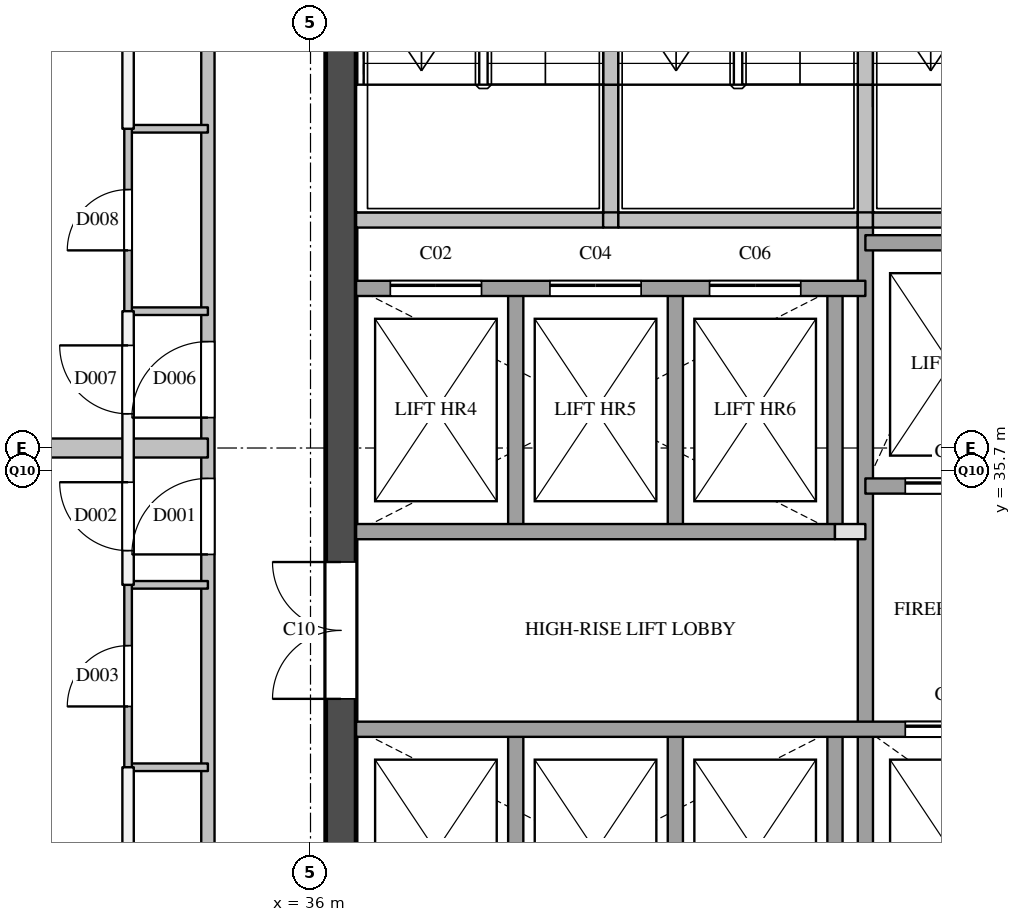
"""IFC4 building model, lengths in metres.
Left out: names, types, materials, properties, quantities, classifications, styles, units other than length and angle.
Written with IfcOpenShell. Run it as: python <this file> out.ifc"""

import sys

from ifc_helpers import new_model, si_unit, direction, frame, frame_2d, origin, place, context, subcontext, project, spatial, rectangle, extrude, element, fill, save


model = new_model("IFC4")
c1 = context("Model", 3, precision=1e-05, world=origin(), true_north=direction((0.0, 1.0)))
c2 = subcontext(c1, "Body", "Model", "MODEL_VIEW")
j1 = project(units=[si_unit("LENGTHUNIT", "METRE"), si_unit("PLANEANGLEUNIT", "RADIAN")], contexts=[c1])
p1 = place(None, origin())
s1 = spatial("IfcSite", under=j1, at=p1, CompositionType="ELEMENT")
p2 = place(p1, origin())
s2 = spatial("IfcBuilding", under=s1, at=p2, CompositionType="ELEMENT")
p3 = place(p2, frame((0.0, 0.0, 273.5)))
s3 = spatial("IfcBuildingStorey", under=s2, at=p3, CompositionType="ELEMENT", Elevation=273.5)
p4 = place(p3, frame((36.4, 29.1, 0.0), z_axis=(0.0, 0.0, 1.0), x_axis=(0.0, 1.0, 0.0)))
e1 = element("IfcWall", 1, at=p4, inside=s3, PredefinedType="SHEAR", context=c2, shape_type="SweptSolid", body=[
    extrude(rectangle(XDim=20.3, YDim=0.4, at=frame_2d((10.15, 0.0))), origin(), (0.0, 0.0, 1.0), 3.6),
])
p5 = place(p4, frame((3.6, 0.0, 0.0)))
e2 = element("IfcOpeningElement", 2, at=p5, cuts=e1, PredefinedType="OPENING", context=c2, shape_type="SweptSolid", body=[
    extrude(rectangle(XDim=1.8, YDim=2.1, at=frame_2d((0.9, 1.05))), frame((0.0, 0.21, 0.0), z_axis=(0.0, -1.0, 0.0), x_axis=(1.0, 0.0, 0.0)), (0.0, 0.0, 1.0), 0.42),
])
p6 = place(p4, frame((16.4, 0.0, 0.0)))
e3 = element("IfcOpeningElement", 3, at=p6, cuts=e1, PredefinedType="OPENING", context=c2, shape_type="SweptSolid", body=[
    extrude(rectangle(XDim=1.0, YDim=2.1, at=frame_2d((0.5, 1.05))), frame((0.0, 0.21, 0.0), z_axis=(0.0, -1.0, 0.0), x_axis=(1.0, 0.0, 0.0)), (0.0, 0.0, 1.0), 0.42),
])
p7 = place(p3, frame((38.7, 29.1, 0.0), z_axis=(0.0, 0.0, 1.0), x_axis=(0.0, 1.0, 0.0)))
e4 = element("IfcWall", 4, at=p7, inside=s3, PredefinedType="SOLIDWALL", context=c2, shape_type="SweptSolid", body=[
    extrude(rectangle(XDim=3.2, YDim=0.2, at=frame_2d((1.6, 0.0))), origin(), (0.0, 0.0, 1.0), 3.6),
])
p8 = place(p3, frame((38.7, 34.9, 0.0), z_axis=(0.0, 0.0, 1.0), x_axis=(0.0, 1.0, 0.0)))
e5 = element("IfcWall", 5, at=p8, inside=s3, PredefinedType="SOLIDWALL", context=c2, shape_type="SweptSolid", body=[
    extrude(rectangle(XDim=3.2, YDim=0.2, at=frame_2d((1.6, 0.0))), origin(), (0.0, 0.0, 1.0), 3.6),
])
p9 = place(p3, frame((39.95, 39.0, 0.0), z_axis=(0.0, 0.0, 1.0), x_axis=(0.0, 1.0, 0.0)))
e6 = element("IfcWall", 6, at=p9, inside=s3, PredefinedType="SOLIDWALL", context=c2, shape_type="SweptSolid", body=[
    extrude(rectangle(XDim=1.78, YDim=0.2, at=frame_2d((0.89, 0.0))), origin(), (0.0, 0.0, 1.0), 3.6),
])
p10 = place(p3, frame((39.95, 40.78, 0.0), z_axis=(0.0, 0.0, 1.0), x_axis=(0.0, 1.0, 0.0)))
e7 = element("IfcWall", 7, at=p10, inside=s3, PredefinedType="SOLIDWALL", context=c2, shape_type="SweptSolid", body=[
    extrude(rectangle(XDim=4.42, YDim=0.2, at=frame_2d((2.21, 0.0))), origin(), (0.0, 0.0, 1.0), 3.6),
])
p11 = place(p3, frame((40.8, 29.1, 0.0), z_axis=(0.0, 0.0, 1.0), x_axis=(0.0, 1.0, 0.0)))
e8 = element("IfcWall", 8, at=p11, inside=s3, PredefinedType="SOLIDWALL", context=c2, shape_type="SweptSolid", body=[
    extrude(rectangle(XDim=3.2, YDim=0.2, at=frame_2d((1.6, 0.0))), origin(), (0.0, 0.0, 1.0), 3.6),
])
p12 = place(p3, frame((40.8, 34.9, 0.0), z_axis=(0.0, 0.0, 1.0), x_axis=(0.0, 1.0, 0.0)))
e9 = element("IfcWall", 9, at=p12, inside=s3, PredefinedType="SOLIDWALL", context=c2, shape_type="SweptSolid", body=[
    extrude(rectangle(XDim=3.2, YDim=0.2, at=frame_2d((1.6, 0.0))), origin(), (0.0, 0.0, 1.0), 3.6),
])
p13 = place(p3, frame((42.9, 29.1, 0.0), z_axis=(0.0, 0.0, 1.0), x_axis=(0.0, 1.0, 0.0)))
e10 = element("IfcWall", 10, at=p13, inside=s3, PredefinedType="SOLIDWALL", context=c2, shape_type="SweptSolid", body=[
    extrude(rectangle(XDim=3.2, YDim=0.2, at=frame_2d((1.6, 0.0))), origin(), (0.0, 0.0, 1.0), 3.6),
])
p14 = place(p3, frame((42.9, 34.9, 0.0), z_axis=(0.0, 0.0, 1.0), x_axis=(0.0, 1.0, 0.0)))
e11 = element("IfcWall", 11, at=p14, inside=s3, PredefinedType="SOLIDWALL", context=c2, shape_type="SweptSolid", body=[
    extrude(rectangle(XDim=3.2, YDim=0.2, at=frame_2d((1.6, 0.0))), origin(), (0.0, 0.0, 1.0), 3.6),
])
p15 = place(p3, frame((43.3, 29.1, 0.0), z_axis=(0.0, 0.0, 1.0), x_axis=(0.0, 1.0, 0.0)))
e12 = element("IfcWall", 12, at=p15, inside=s3, PredefinedType="SOLIDWALL", context=c2, shape_type="SweptSolid", body=[
    extrude(rectangle(XDim=9.9, YDim=0.2, at=frame_2d((4.95, 0.0))), origin(), (0.0, 0.0, 1.0), 3.6),
])
p16 = place(p3, frame((43.3, 39.0, 0.0), z_axis=(0.0, 0.0, 1.0), x_axis=(0.0, 1.0, 0.0)))
e13 = element("IfcWall", 13, at=p16, inside=s3, PredefinedType="SOLIDWALL", context=c2, shape_type="SweptSolid", body=[
    extrude(rectangle(XDim=1.78, YDim=0.2, at=frame_2d((0.89, 0.0))), origin(), (0.0, 0.0, 1.0), 3.6),
])
p17 = place(p3, frame((43.3, 40.78, 0.0), z_axis=(0.0, 0.0, 1.0), x_axis=(0.0, 1.0, 0.0)))
e14 = element("IfcWall", 14, at=p17, inside=s3, PredefinedType="SOLIDWALL", context=c2, shape_type="SweptSolid", body=[
    extrude(rectangle(XDim=4.42, YDim=0.2, at=frame_2d((2.21, 0.0))), origin(), (0.0, 0.0, 1.0), 3.6),
])
p18 = place(p3, frame((36.6, 32.3, 0.0), z_axis=(0.0, 0.0, 1.0), x_axis=(1.0, 0.0, 0.0)))
e15 = element("IfcWall", 15, at=p18, inside=s3, PredefinedType="SOLIDWALL", context=c2, shape_type="SweptSolid", body=[
    extrude(rectangle(XDim=11.2, YDim=0.2, at=frame_2d((5.6, 0.0))), origin(), (0.0, 0.0, 1.0), 3.6),
])
p19 = place(p18, frame((7.225, 0.0, 0.0)))
e16 = element("IfcOpeningElement", 16, at=p19, cuts=e15, PredefinedType="OPENING", context=c2, shape_type="SweptSolid", body=[
    extrude(rectangle(XDim=1.2, YDim=2.1, at=frame_2d((0.6, 1.05))), frame((0.0, 0.11, 0.0), z_axis=(0.0, -1.0, 0.0), x_axis=(1.0, 0.0, 0.0)), (0.0, 0.0, 1.0), 0.22),
])
p20 = place(p18, frame((9.475, 0.0, 0.0)))
e17 = element("IfcOpeningElement", 17, at=p20, cuts=e15, PredefinedType="OPENING", context=c2, shape_type="SweptSolid", body=[
    extrude(rectangle(XDim=1.2, YDim=2.1, at=frame_2d((0.6, 1.05))), frame((0.0, 0.11, 0.0), z_axis=(0.0, -1.0, 0.0), x_axis=(1.0, 0.0, 0.0)), (0.0, 0.0, 1.0), 0.22),
])
p21 = place(p3, frame((42.9, 34.9, 0.0), z_axis=(0.0, 0.0, 1.0), x_axis=(1.0, 0.0, 0.0)))
e18 = element("IfcWall", 18, at=p21, inside=s3, PredefinedType="PARTITIONING", context=c2, shape_type="SweptSolid", body=[
    extrude(rectangle(XDim=0.4, YDim=0.2, at=frame_2d((0.2, 0.0))), origin(), (0.0, 0.0, 1.0), 3.6),
])
p22 = place(p3, frame((36.6, 34.9, 0.0), z_axis=(0.0, 0.0, 1.0), x_axis=(1.0, 0.0, 0.0)))
e19 = element("IfcWall", 19, at=p22, inside=s3, PredefinedType="SOLIDWALL", context=c2, shape_type="SweptSolid", body=[
    extrude(rectangle(XDim=6.3, YDim=0.2, at=frame_2d((3.15, 0.0))), origin(), (0.0, 0.0, 1.0), 3.6),
])
p23 = place(p3, frame((43.3, 35.5, 0.0), z_axis=(0.0, 0.0, 1.0), x_axis=(1.0, 0.0, 0.0)))
e20 = element("IfcWall", 20, at=p23, inside=s3, PredefinedType="SOLIDWALL", context=c2, shape_type="SweptSolid", body=[
    extrude(rectangle(XDim=4.5, YDim=0.2, at=frame_2d((2.25, 0.0))), origin(), (0.0, 0.0, 1.0), 3.6),
])
p24 = place(p23, frame((0.525, 0.0, 0.0)))
e21 = element("IfcOpeningElement", 21, at=p24, cuts=e20, PredefinedType="OPENING", context=c2, shape_type="SweptSolid", body=[
    extrude(rectangle(XDim=1.2, YDim=2.1, at=frame_2d((0.6, 1.05))), frame((0.0, 0.11, 0.0), z_axis=(0.0, -1.0, 0.0), x_axis=(1.0, 0.0, 0.0)), (0.0, 0.0, 1.0), 0.22),
])
p25 = place(p23, frame((3.025, 0.0, 0.0)))
e22 = element("IfcOpeningElement", 22, at=p25, cuts=e20, PredefinedType="OPENING", context=c2, shape_type="SweptSolid", body=[
    extrude(rectangle(XDim=0.7, YDim=2.1, at=frame_2d((0.35, 1.05))), frame((0.0, 0.11, 0.0), z_axis=(0.0, -1.0, 0.0), x_axis=(1.0, 0.0, 0.0)), (0.0, 0.0, 1.0), 0.22),
])
p26 = place(p3, frame((36.6, 38.1, 0.0), z_axis=(0.0, 0.0, 1.0), x_axis=(1.0, 0.0, 0.0)))
e23 = element("IfcWall", 23, at=p26, inside=s3, PredefinedType="SOLIDWALL", context=c2, shape_type="SweptSolid", body=[
    extrude(rectangle(XDim=6.7, YDim=0.2, at=frame_2d((3.35, 0.0))), origin(), (0.0, 0.0, 1.0), 3.6),
])
p27 = place(p26, frame((0.45, 0.0, 0.0)))
e24 = element("IfcOpeningElement", 24, at=p27, cuts=e23, PredefinedType="OPENING", context=c2, shape_type="SweptSolid", body=[
    extrude(rectangle(XDim=1.2, YDim=2.1, at=frame_2d((0.6, 1.05))), frame((0.0, 0.11, 0.0), z_axis=(0.0, -1.0, 0.0), x_axis=(1.0, 0.0, 0.0)), (0.0, 0.0, 1.0), 0.22),
])
p28 = place(p26, frame((2.55, 0.0, 0.0)))
e25 = element("IfcOpeningElement", 25, at=p28, cuts=e23, PredefinedType="OPENING", context=c2, shape_type="SweptSolid", body=[
    extrude(rectangle(XDim=1.2, YDim=2.1, at=frame_2d((0.6, 1.05))), frame((0.0, 0.11, 0.0), z_axis=(0.0, -1.0, 0.0), x_axis=(1.0, 0.0, 0.0)), (0.0, 0.0, 1.0), 0.22),
])
p29 = place(p26, frame((4.65, 0.0, 0.0)))
e26 = element("IfcOpeningElement", 26, at=p29, cuts=e23, PredefinedType="OPENING", context=c2, shape_type="SweptSolid", body=[
    extrude(rectangle(XDim=1.2, YDim=2.1, at=frame_2d((0.6, 1.05))), frame((0.0, 0.11, 0.0), z_axis=(0.0, -1.0, 0.0), x_axis=(1.0, 0.0, 0.0)), (0.0, 0.0, 1.0), 0.22),
])
p30 = place(p3, frame((43.3, 38.7, 0.0), z_axis=(0.0, 0.0, 1.0), x_axis=(1.0, 0.0, 0.0)))
e27 = element("IfcWall", 27, at=p30, inside=s3, PredefinedType="SOLIDWALL", context=c2, shape_type="SweptSolid", body=[
    extrude(rectangle(XDim=4.5, YDim=0.2, at=frame_2d((2.25, 0.0))), origin(), (0.0, 0.0, 1.0), 3.6),
])
p31 = place(p3, frame((36.6, 39.0, 0.0), z_axis=(0.0, 0.0, 1.0), x_axis=(1.0, 0.0, 0.0)))
e28 = element("IfcWall", 28, at=p31, inside=s3, PredefinedType="SOLIDWALL", context=c2, shape_type="SweptSolid", body=[
    extrude(rectangle(XDim=3.25, YDim=0.2, at=frame_2d((1.625, 0.0))), origin(), (0.0, 0.0, 1.0), 3.6),
])
p32 = place(p3, frame((39.85, 39.0, 0.0), z_axis=(0.0, 0.0, 1.0), x_axis=(1.0, 0.0, 0.0)))
e29 = element("IfcWall", 29, at=p32, inside=s3, PredefinedType="SOLIDWALL", context=c2, shape_type="SweptSolid", body=[
    extrude(rectangle(XDim=0.2, YDim=0.2, at=frame_2d((0.1, 0.0))), origin(), (0.0, 0.0, 1.0), 3.6),
])
p33 = place(p3, frame((40.05, 39.0, 0.0), z_axis=(0.0, 0.0, 1.0), x_axis=(1.0, 0.0, 0.0)))
e30 = element("IfcWall", 30, at=p33, inside=s3, PredefinedType="SOLIDWALL", context=c2, shape_type="SweptSolid", body=[
    extrude(rectangle(XDim=3.15, YDim=0.2, at=frame_2d((1.575, 0.0))), origin(), (0.0, 0.0, 1.0), 3.6),
])
p34 = place(p3, frame((43.2, 39.0, 0.0), z_axis=(0.0, 0.0, 1.0), x_axis=(1.0, 0.0, 0.0)))
e31 = element("IfcWall", 31, at=p34, inside=s3, PredefinedType="SOLIDWALL", context=c2, shape_type="SweptSolid", body=[
    extrude(rectangle(XDim=0.2, YDim=0.2, at=frame_2d((0.1, 0.0))), origin(), (0.0, 0.0, 1.0), 3.6),
])
p35 = place(p3, frame((43.4, 39.0, 0.0), z_axis=(0.0, 0.0, 1.0), x_axis=(1.0, 0.0, 0.0)))
e32 = element("IfcWall", 32, at=p35, inside=s3, PredefinedType="SOLIDWALL", context=c2, shape_type="SweptSolid", body=[
    extrude(rectangle(XDim=3.25, YDim=0.2, at=frame_2d((1.625, 0.0))), origin(), (0.0, 0.0, 1.0), 3.6),
])
p36 = place(p3, frame((34.65, 28.5, 0.0), z_axis=(0.0, 0.0, 1.0), x_axis=(0.0, 1.0, 0.0)))
e33 = element("IfcWall", 33, at=p36, inside=s3, PredefinedType="PARTITIONING", context=c2, shape_type="SweptSolid", body=[
    extrude(rectangle(XDim=22.85, YDim=0.175, at=frame_2d((11.425, 0.0))), origin(), (0.0, 0.0, 1.0), 3.6),
])
p37 = place(p36, frame((6.1, 0.0, 0.0)))
e34 = element("IfcOpeningElement", 34, at=p37, cuts=e33, PredefinedType="OPENING", context=c2, shape_type="SweptSolid", body=[
    extrude(rectangle(XDim=1.0, YDim=2.1, at=frame_2d((0.5, 1.05))), frame((0.0, 0.097, 0.0), z_axis=(0.0, -1.0, 0.0), x_axis=(1.0, 0.0, 0.0)), (0.0, 0.0, 1.0), 0.195),
])
p38 = place(p36, frame((7.9, 0.0, 0.0)))
e35 = element("IfcOpeningElement", 35, at=p38, cuts=e33, PredefinedType="OPENING", context=c2, shape_type="SweptSolid", body=[
    extrude(rectangle(XDim=1.0, YDim=2.1, at=frame_2d((0.5, 1.05))), frame((0.0, 0.097, 0.0), z_axis=(0.0, -1.0, 0.0), x_axis=(1.0, 0.0, 0.0)), (0.0, 0.0, 1.0), 0.195),
])
p39 = place(p3, frame((33.6, 27.0, 0.0), z_axis=(0.0, 0.0, 1.0), x_axis=(0.0, 1.0, 0.0)))
e36 = element("IfcWall", 36, at=p39, inside=s3, PredefinedType="PARTITIONING", context=c2, shape_type="SweptSolid", body=[
    extrude(rectangle(XDim=4.8, YDim=0.15, at=frame_2d((2.4, 0.0))), origin(), (0.0, 0.0, 1.0), 2.6),
])
p40 = place(p39, frame((1.95, 0.0, 0.0)))
e37 = element("IfcOpeningElement", 37, at=p40, cuts=e36, PredefinedType="OPENING", context=c2, shape_type="SweptSolid", body=[
    extrude(rectangle(XDim=0.9, YDim=2.1, at=frame_2d((0.45, 1.05))), frame((0.0, 0.085, 0.0), z_axis=(0.0, -1.0, 0.0), x_axis=(1.0, 0.0, 0.0)), (0.0, 0.0, 1.0), 0.17),
])
p41 = place(p3, frame((33.6, 34.2, 0.0), z_axis=(0.0, 0.0, 1.0), x_axis=(0.0, 1.0, 0.0)))
e38 = element("IfcWall", 38, at=p41, inside=s3, PredefinedType="PARTITIONING", context=c2, shape_type="SweptSolid", body=[
    extrude(rectangle(XDim=3.6, YDim=0.15, at=frame_2d((1.8, 0.0))), origin(), (0.0, 0.0, 1.0), 3.6),
])
p42 = place(p41, frame((0.45, 0.0, 0.0)))
e39 = element("IfcOpeningElement", 39, at=p42, cuts=e38, PredefinedType="OPENING", context=c2, shape_type="SweptSolid", body=[
    extrude(rectangle(XDim=0.9, YDim=2.1, at=frame_2d((0.45, 1.05))), frame((0.0, 0.085, 0.0), z_axis=(0.0, -1.0, 0.0), x_axis=(1.0, 0.0, 0.0)), (0.0, 0.0, 1.0), 0.17),
])
p43 = place(p41, frame((2.25, 0.0, 0.0)))
e40 = element("IfcOpeningElement", 40, at=p43, cuts=e38, PredefinedType="OPENING", context=c2, shape_type="SweptSolid", body=[
    extrude(rectangle(XDim=0.9, YDim=2.1, at=frame_2d((0.45, 1.05))), frame((0.0, 0.085, 0.0), z_axis=(0.0, -1.0, 0.0), x_axis=(1.0, 0.0, 0.0)), (0.0, 0.0, 1.0), 0.17),
])
p44 = place(p3, frame((33.6, 40.2, 0.0), z_axis=(0.0, 0.0, 1.0), x_axis=(0.0, 1.0, 0.0)))
e41 = element("IfcWall", 41, at=p44, inside=s3, PredefinedType="PARTITIONING", context=c2, shape_type="SweptSolid", body=[
    extrude(rectangle(XDim=13.8, YDim=0.15, at=frame_2d((6.9, 0.0))), origin(), (0.0, 0.0, 1.0), 2.6),
])
p45 = place(p44, frame((6.45, 0.0, 0.0)))
e42 = element("IfcOpeningElement", 42, at=p45, cuts=e41, PredefinedType="OPENING", context=c2, shape_type="SweptSolid", body=[
    extrude(rectangle(XDim=0.9, YDim=2.1, at=frame_2d((0.45, 1.05))), frame((0.0, 0.085, 0.0), z_axis=(0.0, -1.0, 0.0), x_axis=(1.0, 0.0, 0.0)), (0.0, 0.0, 1.0), 0.17),
])
p46 = place(p3, frame((18.0, 36.0, 0.0), z_axis=(0.0, 0.0, 1.0), x_axis=(1.0, 0.0, 0.0)))
e43 = element("IfcWall", 43, at=p46, inside=s3, PredefinedType="PARTITIONING", context=c2, shape_type="SweptSolid", body=[
    extrude(rectangle(XDim=16.65, YDim=0.25, at=frame_2d((8.325, 0.0))), origin(), (0.0, 0.0, 1.0), 3.6),
])
for number, where, z_axis, x_axis in (
    (44, (33.6, 31.8, 0.0), (0.0, 0.0, 1.0), (1.0, 0.0, 0.0)),
    (45, (33.6, 34.2, 0.0), (0.0, 0.0, 1.0), (1.0, 0.0, 0.0)),
    (46, (33.6, 37.8, 0.0), (0.0, 0.0, 1.0), (1.0, 0.0, 0.0)),
    (47, (33.6, 40.2, 0.0), (0.0, 0.0, 1.0), (1.0, 0.0, 0.0)),
):
    element("IfcWall", number, at=place(p3, frame(where, z_axis=z_axis, x_axis=x_axis)), inside=s3, PredefinedType="PARTITIONING", context=c2, shape_type="SweptSolid", body=[
        extrude(rectangle(XDim=1.05, YDim=0.1, at=frame_2d((0.525, 0.0))), origin(), (0.0, 0.0, 1.0), 3.6),
    ])
p47 = place(p3, frame((33.6, 31.8, 0.0), z_axis=(0.0, 0.0, 1.0), x_axis=(0.0, 1.0, 0.0)))
e48 = element("IfcWall", 48, at=p47, inside=s3, PredefinedType="PARTITIONING", context=c2, shape_type="SweptSolid", body=[
    extrude(rectangle(XDim=2.4, YDim=0.1, at=frame_2d((1.2, 0.0))), origin(), (0.0, 0.0, 1.0), 3.6),
])
p48 = place(p47, frame((0.8, 0.0, 0.0)))
e49 = element("IfcOpeningElement", 49, at=p48, cuts=e48, PredefinedType="OPENING", context=c2, shape_type="SweptSolid", body=[
    extrude(rectangle(XDim=0.8, YDim=2.1, at=frame_2d((0.4, 1.05))), frame((0.0, 0.06, 0.0), z_axis=(0.0, -1.0, 0.0), x_axis=(1.0, 0.0, 0.0)), (0.0, 0.0, 1.0), 0.12),
])
p49 = place(p3, frame((33.6, 37.8, 0.0), z_axis=(0.0, 0.0, 1.0), x_axis=(0.0, 1.0, 0.0)))
e50 = element("IfcWall", 50, at=p49, inside=s3, PredefinedType="PARTITIONING", context=c2, shape_type="SweptSolid", body=[
    extrude(rectangle(XDim=2.4, YDim=0.1, at=frame_2d((1.2, 0.0))), origin(), (0.0, 0.0, 1.0), 3.6),
])
p50 = place(p49, frame((0.8, 0.0, 0.0)))
e51 = element("IfcOpeningElement", 51, at=p50, cuts=e50, PredefinedType="OPENING", context=c2, shape_type="SweptSolid", body=[
    extrude(rectangle(XDim=0.8, YDim=2.1, at=frame_2d((0.4, 1.05))), frame((0.0, 0.06, 0.0), z_axis=(0.0, -1.0, 0.0), x_axis=(1.0, 0.0, 0.0)), (0.0, 0.0, 1.0), 0.12),
])
p51 = place(p27, origin())
e52 = element("IfcDoor", 52, at=p51, inside=s3, OperationType="SLIDING_TO_LEFT", PredefinedType="DOOR", context=c2, shape_type="SweptSolid", body=[
    extrude(rectangle(XDim=1.2, YDim=2.1, at=frame_2d((0.6, 1.05))), frame((0.0, 0.025, 0.0), z_axis=(0.0, -1.0, 0.0), x_axis=(1.0, 0.0, 0.0)), (0.0, 0.0, 1.0), 0.05),
])
fill(e24, e52)
p52 = place(p28, origin())
e53 = element("IfcDoor", 53, at=p52, inside=s3, OperationType="SLIDING_TO_LEFT", PredefinedType="DOOR", context=c2, shape_type="SweptSolid", body=[
    extrude(rectangle(XDim=1.2, YDim=2.1, at=frame_2d((0.6, 1.05))), frame((0.0, 0.025, 0.0), z_axis=(0.0, -1.0, 0.0), x_axis=(1.0, 0.0, 0.0)), (0.0, 0.0, 1.0), 0.05),
])
fill(e25, e53)
p53 = place(p29, origin())
e54 = element("IfcDoor", 54, at=p53, inside=s3, OperationType="SLIDING_TO_LEFT", PredefinedType="DOOR", context=c2, shape_type="SweptSolid", body=[
    extrude(rectangle(XDim=1.2, YDim=2.1, at=frame_2d((0.6, 1.05))), frame((0.0, 0.025, 0.0), z_axis=(0.0, -1.0, 0.0), x_axis=(1.0, 0.0, 0.0)), (0.0, 0.0, 1.0), 0.05),
])
fill(e26, e54)
p54 = place(p19, origin())
e55 = element("IfcDoor", 55, at=p54, inside=s3, OperationType="SLIDING_TO_LEFT", PredefinedType="DOOR", context=c2, shape_type="SweptSolid", body=[
    extrude(rectangle(XDim=1.2, YDim=2.1, at=frame_2d((0.6, 1.05))), frame((0.0, 0.025, 0.0), z_axis=(0.0, -1.0, 0.0), x_axis=(1.0, 0.0, 0.0)), (0.0, 0.0, 1.0), 0.05),
])
fill(e16, e55)
p55 = place(p24, origin())
e56 = element("IfcDoor", 56, at=p55, inside=s3, OperationType="SLIDING_TO_LEFT", PredefinedType="DOOR", context=c2, shape_type="SweptSolid", body=[
    extrude(rectangle(XDim=1.2, YDim=2.1, at=frame_2d((0.6, 1.05))), frame((0.0, 0.025, 0.0), z_axis=(0.0, -1.0, 0.0), x_axis=(1.0, 0.0, 0.0)), (0.0, 0.0, 1.0), 0.05),
])
fill(e21, e56)
p56 = place(p5, origin())
e57 = element("IfcDoor", 57, at=p56, inside=s3, OperationType="DOUBLE_DOOR_SINGLE_SWING", PredefinedType="DOOR", context=c2, shape_type="SweptSolid", body=[
    extrude(rectangle(XDim=1.8, YDim=2.1, at=frame_2d((0.9, 1.05))), frame((0.0, 0.025, 0.0), z_axis=(0.0, -1.0, 0.0), x_axis=(1.0, 0.0, 0.0)), (0.0, 0.0, 1.0), 0.05),
])
fill(e2, e57)
p57 = place(p37, origin())
e58 = element("IfcDoor", 58, at=p57, inside=s3, OperationType="SINGLE_SWING_LEFT", PredefinedType="DOOR", context=c2, shape_type="SweptSolid", body=[
    extrude(rectangle(XDim=1.0, YDim=2.1, at=frame_2d((0.5, 1.05))), frame((0.0, 0.025, 0.0), z_axis=(0.0, -1.0, 0.0), x_axis=(1.0, 0.0, 0.0)), (0.0, 0.0, 1.0), 0.05),
])
fill(e34, e58)
p58 = place(p42, origin())
e59 = element("IfcDoor", 59, at=p58, inside=s3, OperationType="SINGLE_SWING_RIGHT", PredefinedType="DOOR", context=c2, shape_type="SweptSolid", body=[
    extrude(rectangle(XDim=0.9, YDim=2.1, at=frame_2d((0.45, 1.05))), frame((0.0, 0.025, 0.0), z_axis=(0.0, -1.0, 0.0), x_axis=(1.0, 0.0, 0.0)), (0.0, 0.0, 1.0), 0.05),
])
fill(e39, e59)
p59 = place(p48, origin())
e60 = element("IfcDoor", 60, at=p59, inside=s3, OperationType="SINGLE_SWING_LEFT", PredefinedType="DOOR", context=c2, shape_type="SweptSolid", body=[
    extrude(rectangle(XDim=0.8, YDim=2.1, at=frame_2d((0.4, 1.05))), frame((0.0, 0.025, 0.0), z_axis=(0.0, -1.0, 0.0), x_axis=(1.0, 0.0, 0.0)), (0.0, 0.0, 1.0), 0.05),
])
fill(e49, e60)
p60 = place(p38, origin())
e61 = element("IfcDoor", 61, at=p60, inside=s3, OperationType="SINGLE_SWING_LEFT", PredefinedType="DOOR", context=c2, shape_type="SweptSolid", body=[
    extrude(rectangle(XDim=1.0, YDim=2.1, at=frame_2d((0.5, 1.05))), frame((0.0, 0.025, 0.0), z_axis=(0.0, -1.0, 0.0), x_axis=(1.0, 0.0, 0.0)), (0.0, 0.0, 1.0), 0.05),
])
fill(e35, e61)
p61 = place(p43, origin())
e62 = element("IfcDoor", 62, at=p61, inside=s3, OperationType="SINGLE_SWING_RIGHT", PredefinedType="DOOR", context=c2, shape_type="SweptSolid", body=[
    extrude(rectangle(XDim=0.9, YDim=2.1, at=frame_2d((0.45, 1.05))), frame((0.0, 0.025, 0.0), z_axis=(0.0, -1.0, 0.0), x_axis=(1.0, 0.0, 0.0)), (0.0, 0.0, 1.0), 0.05),
])
fill(e40, e62)
p62 = place(p50, origin())
e63 = element("IfcDoor", 63, at=p62, inside=s3, OperationType="SINGLE_SWING_LEFT", PredefinedType="DOOR", context=c2, shape_type="SweptSolid", body=[
    extrude(rectangle(XDim=0.8, YDim=2.1, at=frame_2d((0.4, 1.05))), frame((0.0, 0.025, 0.0), z_axis=(0.0, -1.0, 0.0), x_axis=(1.0, 0.0, 0.0)), (0.0, 0.0, 1.0), 0.05),
])
fill(e51, e63)
save(model, sys.argv[1])
